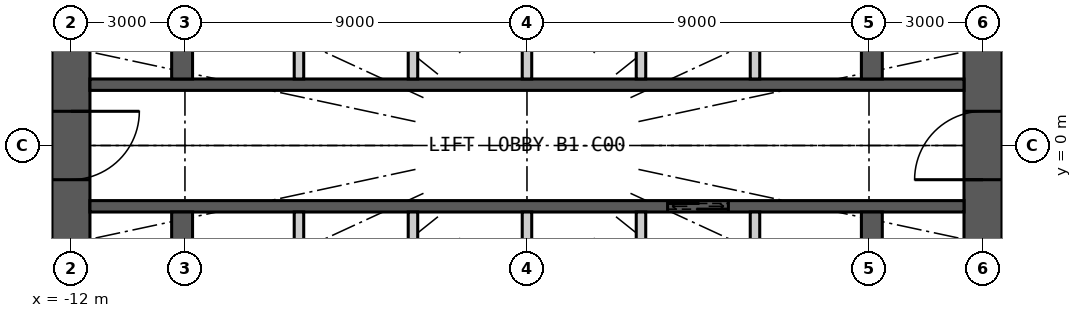
"""IFC4 building model, lengths in metres.
Left out: names, types, materials, properties, quantities, classifications, styles, units other than length and angle.
Written with IfcOpenShell. Run it as: python <this file> out.ifc"""

import sys

from ifc_helpers import new_model, si_unit, direction, frame, frame_2d, origin, place, context, subcontext, project, spatial, rectangle, extrude, element, fill, save


model = new_model("IFC4")
c1 = context("Model", 3, precision=1e-05, world=origin(), true_north=direction((0.0, 1.0)))
c2 = subcontext(c1, "Body", "Model", "MODEL_VIEW")
j1 = project(units=[si_unit("LENGTHUNIT", "METRE"), si_unit("PLANEANGLEUNIT", "RADIAN")], contexts=[c1])
p1 = place(None, origin())
s1 = spatial("IfcSite", under=j1, at=p1, CompositionType="ELEMENT")
p2 = place(p1, origin())
s2 = spatial("IfcBuilding", under=s1, at=p2, CompositionType="ELEMENT")
p3 = place(p2, frame((0.0, 0.0, -6.0)))
s3 = spatial("IfcBuildingStorey", under=s2, at=p3, CompositionType="ELEMENT", Elevation=-6.0)
p4 = place(p3, frame((12.0, -7.5, 0.0), z_axis=(0.0, 0.0, 1.0), x_axis=(0.0, 1.0, 0.0)))
e1 = element("IfcWall", 1, at=p4, inside=s3, PredefinedType="SHEAR", context=c2, shape_type="SweptSolid", body=[
    extrude(rectangle(XDim=15.0, YDim=1.0, at=frame_2d((7.5, 0.0))), origin(), (0.0, 0.0, 1.0), 6.0),
])
p5 = place(p4, frame((6.6, 0.0, 0.0)))
e2 = element("IfcOpeningElement", 2, at=p5, cuts=e1, PredefinedType="OPENING", context=c2, shape_type="SweptSolid", body=[
    extrude(rectangle(XDim=1.8, YDim=2.2, at=frame_2d((0.9, 1.1))), frame((0.0, 0.51, 0.0), z_axis=(0.0, -1.0, 0.0), x_axis=(1.0, 0.0, 0.0)), (0.0, 0.0, 1.0), 1.02),
])
p6 = place(p3, frame((-12.0, 7.5, 0.0), z_axis=(0.0, 0.0, 1.0), x_axis=(0.0, -1.0, 0.0)))
e3 = element("IfcWall", 3, at=p6, inside=s3, PredefinedType="SHEAR", context=c2, shape_type="SweptSolid", body=[
    extrude(rectangle(XDim=15.0, YDim=1.0, at=frame_2d((7.5, 0.0))), origin(), (0.0, 0.0, 1.0), 6.0),
])
p7 = place(p6, frame((6.6, 0.0, 0.0)))
e4 = element("IfcOpeningElement", 4, at=p7, cuts=e3, PredefinedType="OPENING", context=c2, shape_type="SweptSolid", body=[
    extrude(rectangle(XDim=1.8, YDim=2.2, at=frame_2d((0.9, 1.1))), frame((0.0, 0.51, 0.0), z_axis=(0.0, -1.0, 0.0), x_axis=(1.0, 0.0, 0.0)), (0.0, 0.0, 1.0), 1.02),
])
p8 = place(p3, frame((-11.5, 1.6, 0.0), z_axis=(0.0, 0.0, 1.0), x_axis=(1.0, 0.0, 0.0)))
e5 = element("IfcWall", 5, at=p8, inside=s3, PredefinedType="SHEAR", context=c2, shape_type="SweptSolid", body=[
    extrude(rectangle(XDim=23.0, YDim=0.3, at=frame_2d((11.5, 0.0))), origin(), (0.0, 0.0, 1.0), 6.0),
])
p9 = place(p3, frame((-11.5, -1.6, 0.0), z_axis=(0.0, 0.0, 1.0), x_axis=(1.0, 0.0, 0.0)))
e6 = element("IfcWall", 6, at=p9, inside=s3, PredefinedType="SHEAR", context=c2, shape_type="SweptSolid", body=[
    extrude(rectangle(XDim=23.0, YDim=0.3, at=frame_2d((11.5, 0.0))), origin(), (0.0, 0.0, 1.0), 6.0),
])
p10 = place(p9, frame((15.2, 0.0, 0.0)))
e7 = element("IfcOpeningElement", 7, at=p10, cuts=e6, PredefinedType="OPENING", context=c2, shape_type="SweptSolid", body=[
    extrude(rectangle(XDim=1.6, YDim=2.4, at=frame_2d((0.8, 1.2))), frame((0.0, 0.16, 0.0), z_axis=(0.0, -1.0, 0.0), x_axis=(1.0, 0.0, 0.0)), (0.0, 0.0, 1.0), 0.32),
])
for number, where, z_axis, x_axis in (
    (8, (-9.075, 1.75, 0.0), (0.0, 0.0, 1.0), (0.0, 1.0, 0.0)),
    (9, (-9.075, -4.1, 0.0), (0.0, 0.0, 1.0), (0.0, 1.0, 0.0)),
    (10, (9.075, 1.75, 0.0), (0.0, 0.0, 1.0), (0.0, 1.0, 0.0)),
    (11, (9.075, -4.1, 0.0), (0.0, 0.0, 1.0), (0.0, 1.0, 0.0)),
):
    element("IfcWall", number, at=place(p3, frame(where, z_axis=z_axis, x_axis=x_axis)), inside=s3, PredefinedType="SHEAR", context=c2, shape_type="SweptSolid", body=[
        extrude(rectangle(XDim=2.35, YDim=0.55, at=frame_2d((1.175, 0.0))), origin(), (0.0, 0.0, 1.0), 6.0),
    ])
for number, where, z_axis, x_axis in (
    (12, (-6.0, 1.75, 0.0), (0.0, 0.0, 1.0), (0.0, 1.0, 0.0)),
    (13, (-3.0, 1.75, 0.0), (0.0, 0.0, 1.0), (0.0, 1.0, 0.0)),
    (14, (0.0, 1.75, 0.0), (0.0, 0.0, 1.0), (0.0, 1.0, 0.0)),
    (15, (3.0, 1.75, 0.0), (0.0, 0.0, 1.0), (0.0, 1.0, 0.0)),
    (16, (6.0, 1.75, 0.0), (0.0, 0.0, 1.0), (0.0, 1.0, 0.0)),
    (17, (-6.0, -4.1, 0.0), (0.0, 0.0, 1.0), (0.0, 1.0, 0.0)),
    (18, (-3.0, -4.1, 0.0), (0.0, 0.0, 1.0), (0.0, 1.0, 0.0)),
    (19, (0.0, -4.1, 0.0), (0.0, 0.0, 1.0), (0.0, 1.0, 0.0)),
    (20, (3.0, -4.1, 0.0), (0.0, 0.0, 1.0), (0.0, 1.0, 0.0)),
    (21, (6.0, -4.1, 0.0), (0.0, 0.0, 1.0), (0.0, 1.0, 0.0)),
):
    element("IfcWall", number, at=place(p3, frame(where, z_axis=z_axis, x_axis=x_axis)), inside=s3, PredefinedType="PARTITIONING", context=c2, shape_type="SweptSolid", body=[
        extrude(rectangle(XDim=2.35, YDim=0.25, at=frame_2d((1.175, 0.0))), origin(), (0.0, 0.0, 1.0), 6.0),
    ])
p11 = place(p10, origin())
e22 = element("IfcDoor", 22, at=p11, inside=s3, OperationType="DOUBLE_DOOR_SLIDING", PredefinedType="DOOR", context=c2, shape_type="SweptSolid", body=[
    extrude(rectangle(XDim=1.6, YDim=2.4, at=frame_2d((0.8, 1.2))), frame((0.0, 0.025, 0.0), z_axis=(0.0, -1.0, 0.0), x_axis=(1.0, 0.0, 0.0)), (0.0, 0.0, 1.0), 0.05),
])
fill(e7, e22)
p12 = place(p5, origin())
e23 = element("IfcDoor", 23, at=p12, inside=s3, OperationType="DOUBLE_DOOR_DOUBLE_SWING", PredefinedType="DOOR", context=c2, shape_type="SweptSolid", body=[
    extrude(rectangle(XDim=1.8, YDim=2.2, at=frame_2d((0.9, 1.1))), frame((0.0, 0.025, 0.0), z_axis=(0.0, -1.0, 0.0), x_axis=(1.0, 0.0, 0.0)), (0.0, 0.0, 1.0), 0.05),
])
fill(e2, e23)
p13 = place(p7, origin())
e24 = element("IfcDoor", 24, at=p13, inside=s3, OperationType="DOUBLE_DOOR_DOUBLE_SWING", PredefinedType="DOOR", context=c2, shape_type="SweptSolid", body=[
    extrude(rectangle(XDim=1.8, YDim=2.2, at=frame_2d((0.9, 1.1))), frame((0.0, 0.025, 0.0), z_axis=(0.0, -1.0, 0.0), x_axis=(1.0, 0.0, 0.0)), (0.0, 0.0, 1.0), 0.05),
])
fill(e4, e24)
save(model, sys.argv[1])
